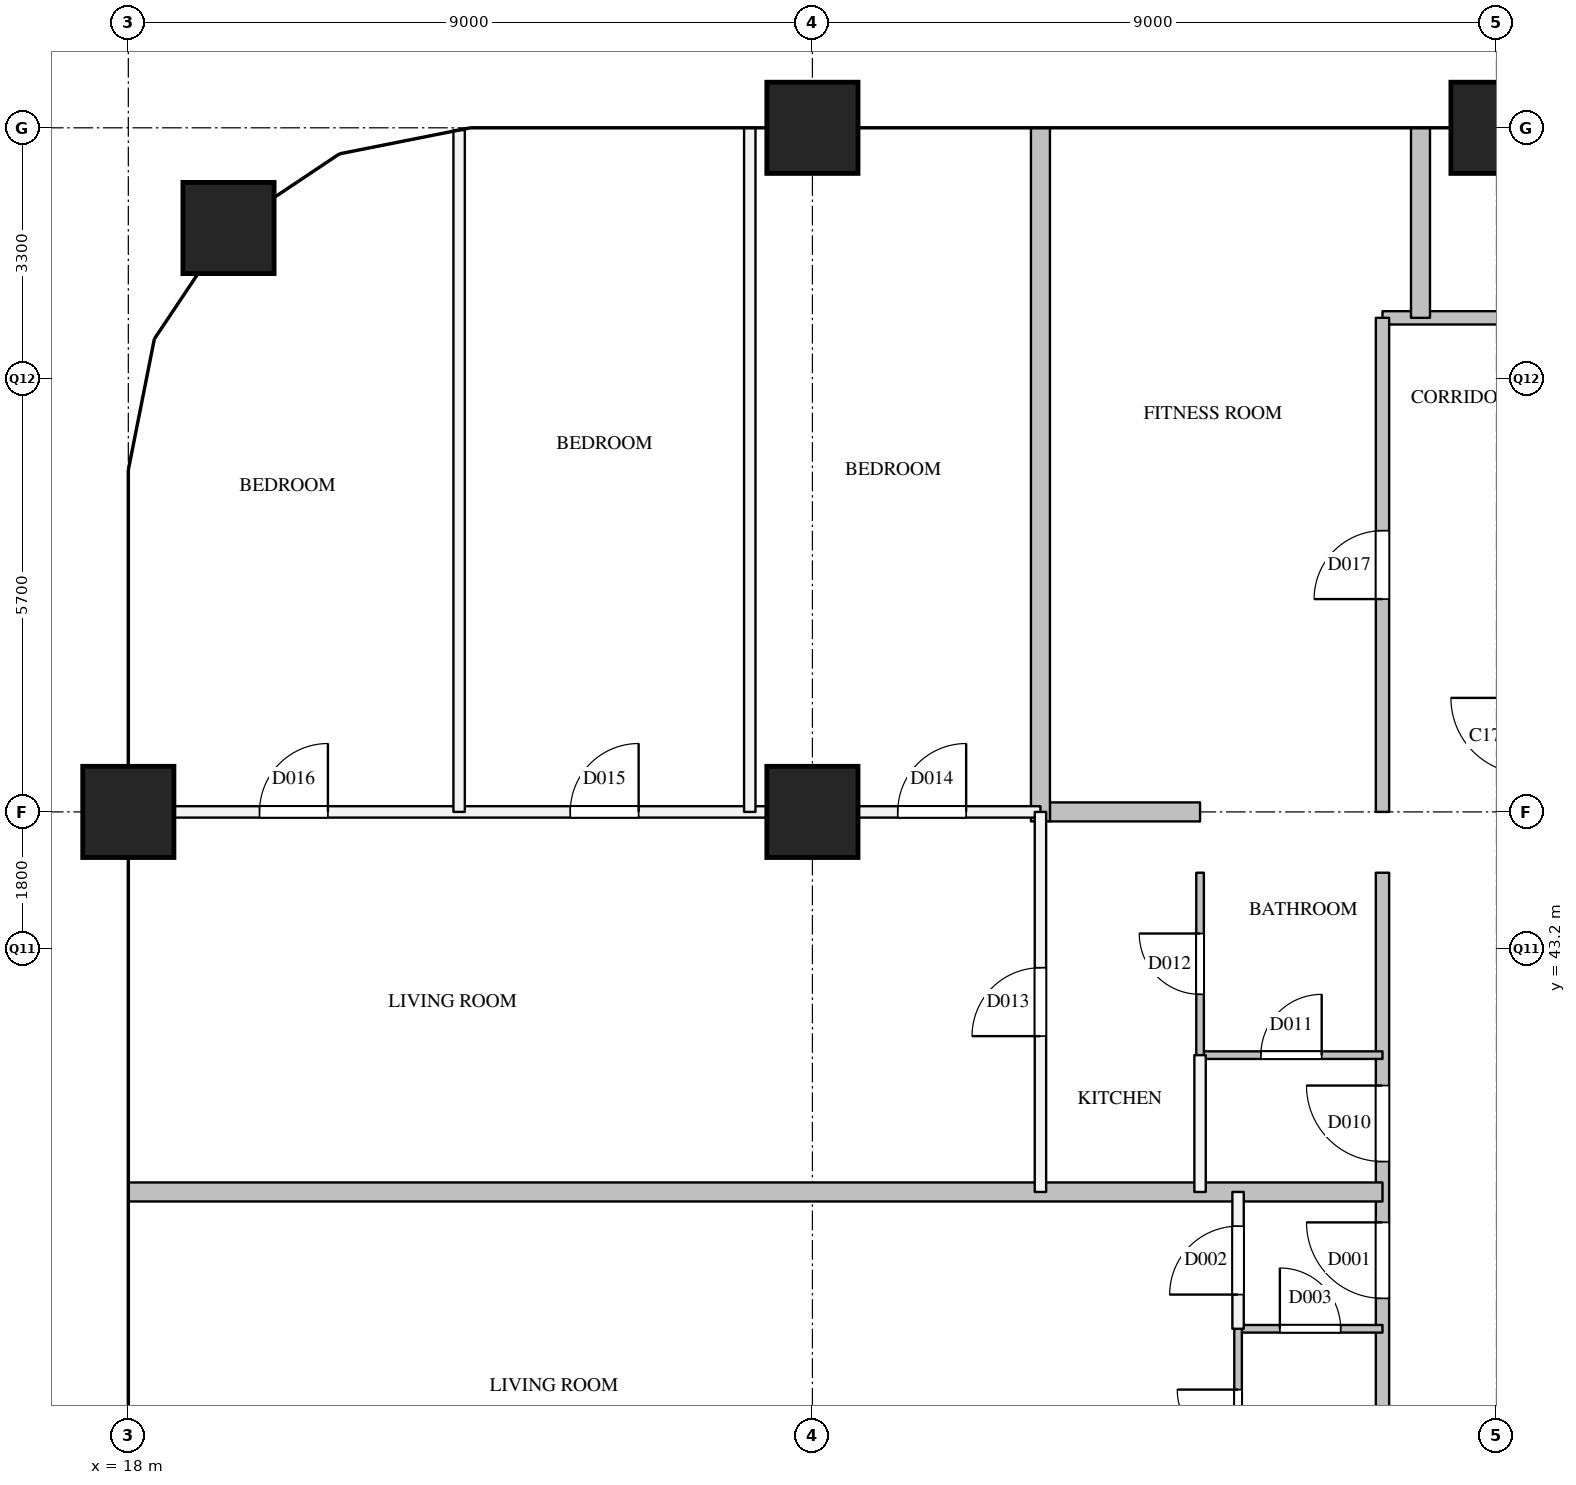
"""IFC4 building model, lengths in metres.
Left out: names, types, materials, properties, quantities, classifications, styles, units other than length and angle.
Written with IfcOpenShell. Run it as: python <this file> out.ifc"""

import sys

from ifc_helpers import new_model, si_unit, direction, frame, frame_2d, origin, origin_2d, place, context, subcontext, project, spatial, rectangle, extrude, element, fill, save


model = new_model("IFC4")
c1 = context("Model", 3, precision=1e-05, world=origin(), true_north=direction((0.0, 1.0)))
c2 = subcontext(c1, "Body", "Model", "MODEL_VIEW")
j1 = project(units=[si_unit("LENGTHUNIT", "METRE"), si_unit("PLANEANGLEUNIT", "RADIAN")], contexts=[c1])
p1 = place(None, origin())
s1 = spatial("IfcSite", under=j1, at=p1, CompositionType="ELEMENT")
p2 = place(p1, origin())
s2 = spatial("IfcBuilding", under=s1, at=p2, CompositionType="ELEMENT")
p3 = place(p2, frame((0.0, 0.0, 254.0)))
s3 = spatial("IfcBuildingStorey", under=s2, at=p3, CompositionType="ELEMENT", Elevation=254.0)
for number, where, z_axis, x_axis in (
    (1, (18.0, 45.0, 0.0), (0.0, 0.0, 1.0), (1.0, 0.0, 0.0)),
    (2, (19.318, 52.682, 0.0), (0.0, 0.0, 1.0), (1.0, 0.0, 0.0)),
    (3, (27.0, 45.0, 0.0), (0.0, 0.0, 1.0), (1.0, 0.0, 0.0)),
    (4, (27.0, 54.0, 0.0), (0.0, 0.0, 1.0), (1.0, 0.0, 0.0)),
    (5, (36.0, 54.0, 0.0), (0.0, 0.0, 1.0), (1.0, 0.0, 0.0)),
):
    element("IfcColumn", number, at=place(p3, frame(where, z_axis=z_axis, x_axis=x_axis)), inside=s3, PredefinedType="COLUMN", context=c2, shape_type="SweptSolid", body=[
        extrude(rectangle(XDim=1.2, YDim=1.2, at=origin_2d()), origin(), (0.0, 0.0, 1.0), 3.9),
    ])
p4 = place(p3, frame((34.5, 51.5, 0.0), z_axis=(0.0, 0.0, 1.0), x_axis=(1.0, 0.0, 0.0)))
e6 = element("IfcWall", 6, at=p4, inside=s3, PredefinedType="PARTITIONING", context=c2, shape_type="SweptSolid", body=[
    extrude(rectangle(XDim=15.4, YDim=0.175, at=frame_2d((7.7, 0.0))), origin(), (0.0, 0.0, 1.0), 3.6),
])
p5 = place(p4, frame((5.892, 0.0, 0.0)))
e7 = element("IfcOpeningElement", 7, at=p5, cuts=e6, PredefinedType="OPENING", context=c2, shape_type="SweptSolid", body=[
    extrude(rectangle(XDim=1.0, YDim=2.1, at=frame_2d((0.5, 1.05))), frame((0.0, 0.097, 0.0), z_axis=(0.0, -1.0, 0.0), x_axis=(1.0, 0.0, 0.0)), (0.0, 0.0, 1.0), 0.195),
])
p6 = place(p3, frame((34.5, 28.5, 0.0), z_axis=(0.0, 0.0, 1.0), x_axis=(0.0, 1.0, 0.0)))
e8 = element("IfcWall", 8, at=p6, inside=s3, PredefinedType="PARTITIONING", context=c2, shape_type="SweptSolid", body=[
    extrude(rectangle(XDim=15.7, YDim=0.175, at=frame_2d((7.85, 0.0))), origin(), (0.0, 0.0, 1.0), 3.6),
])
p7 = place(p6, frame((10.1, 0.0, 0.0)))
e9 = element("IfcOpeningElement", 9, at=p7, cuts=e8, PredefinedType="OPENING", context=c2, shape_type="SweptSolid", body=[
    extrude(rectangle(XDim=1.0, YDim=2.1, at=frame_2d((0.5, 1.05))), frame((0.0, 0.097, 0.0), z_axis=(0.0, -1.0, 0.0), x_axis=(1.0, 0.0, 0.0)), (0.0, 0.0, 1.0), 0.195),
])
p8 = place(p6, frame((11.9, 0.0, 0.0)))
e10 = element("IfcOpeningElement", 10, at=p8, cuts=e8, PredefinedType="OPENING", context=c2, shape_type="SweptSolid", body=[
    extrude(rectangle(XDim=1.0, YDim=2.1, at=frame_2d((0.5, 1.05))), frame((0.0, 0.097, 0.0), z_axis=(0.0, -1.0, 0.0), x_axis=(1.0, 0.0, 0.0)), (0.0, 0.0, 1.0), 0.195),
])
p9 = place(p3, frame((34.5, 45.0, 0.0), z_axis=(0.0, 0.0, 1.0), x_axis=(0.0, 1.0, 0.0)))
e11 = element("IfcWall", 11, at=p9, inside=s3, PredefinedType="PARTITIONING", context=c2, shape_type="SweptSolid", body=[
    extrude(rectangle(XDim=6.5, YDim=0.175, at=frame_2d((3.25, 0.0))), origin(), (0.0, 0.0, 1.0), 3.6),
])
p10 = place(p9, frame((2.8, 0.0, 0.0)))
e12 = element("IfcOpeningElement", 12, at=p10, cuts=e11, PredefinedType="OPENING", context=c2, shape_type="SweptSolid", body=[
    extrude(rectangle(XDim=0.9, YDim=2.1, at=frame_2d((0.45, 1.05))), frame((0.0, 0.097, 0.0), z_axis=(0.0, -1.0, 0.0), x_axis=(1.0, 0.0, 0.0)), (0.0, 0.0, 1.0), 0.195),
])
p11 = place(p3, frame((18.0, 45.0, 0.0), z_axis=(0.0, 0.0, 1.0), x_axis=(1.0, 0.0, 0.0)))
e13 = element("IfcWall", 13, at=p11, inside=s3, PredefinedType="PARTITIONING", context=c2, shape_type="SweptSolid", body=[
    extrude(rectangle(XDim=12.0, YDim=0.15, at=frame_2d((6.0, 0.0))), origin(), (0.0, 0.0, 1.0), 3.6),
])
p12 = place(p11, frame((10.123, 0.0, 0.0)))
e14 = element("IfcOpeningElement", 14, at=p12, cuts=e13, PredefinedType="OPENING", context=c2, shape_type="SweptSolid", body=[
    extrude(rectangle(XDim=0.9, YDim=2.1, at=frame_2d((0.45, 1.05))), frame((0.0, 0.085, 0.0), z_axis=(0.0, -1.0, 0.0), x_axis=(1.0, 0.0, 0.0)), (0.0, 0.0, 1.0), 0.17),
])
p13 = place(p11, frame((5.814, 0.0, 0.0)))
e15 = element("IfcOpeningElement", 15, at=p13, cuts=e13, PredefinedType="OPENING", context=c2, shape_type="SweptSolid", body=[
    extrude(rectangle(XDim=0.9, YDim=2.1, at=frame_2d((0.45, 1.05))), frame((0.0, 0.085, 0.0), z_axis=(0.0, -1.0, 0.0), x_axis=(1.0, 0.0, 0.0)), (0.0, 0.0, 1.0), 0.17),
])
p14 = place(p11, frame((1.726, 0.0, 0.0)))
e16 = element("IfcOpeningElement", 16, at=p14, cuts=e13, PredefinedType="OPENING", context=c2, shape_type="SweptSolid", body=[
    extrude(rectangle(XDim=0.9, YDim=2.1, at=frame_2d((0.45, 1.05))), frame((0.0, 0.085, 0.0), z_axis=(0.0, -1.0, 0.0), x_axis=(1.0, 0.0, 0.0)), (0.0, 0.0, 1.0), 0.17),
])
p15 = place(p3, frame((22.352, 45.0, 0.0), z_axis=(0.0, 0.0, 1.0), x_axis=(0.0, 1.0, 0.0)))
e17 = element("IfcWall", 17, at=p15, inside=s3, PredefinedType="PARTITIONING", context=c2, shape_type="SweptSolid", body=[
    extrude(rectangle(XDim=8.97, YDim=0.15, at=frame_2d((4.485, 0.0))), origin(), (0.0, 0.0, 1.0), 2.6),
])
p16 = place(p3, frame((26.176, 45.0, 0.0), z_axis=(0.0, 0.0, 1.0), x_axis=(0.0, 1.0, 0.0)))
e18 = element("IfcWall", 18, at=p16, inside=s3, PredefinedType="PARTITIONING", context=c2, shape_type="SweptSolid", body=[
    extrude(rectangle(XDim=9.0, YDim=0.15, at=frame_2d((4.5, 0.0))), origin(), (0.0, 0.0, 1.0), 2.6),
])
p17 = place(p3, frame((30.0, 40.0, 0.0), z_axis=(0.0, 0.0, 1.0), x_axis=(0.0, 1.0, 0.0)))
e19 = element("IfcWall", 19, at=p17, inside=s3, PredefinedType="PARTITIONING", context=c2, shape_type="SweptSolid", body=[
    extrude(rectangle(XDim=5.0, YDim=0.15, at=frame_2d((2.5, 0.0))), origin(), (0.0, 0.0, 1.0), 3.6),
])
p18 = place(p17, frame((2.05, 0.0, 0.0)))
e20 = element("IfcOpeningElement", 20, at=p18, cuts=e19, PredefinedType="OPENING", context=c2, shape_type="SweptSolid", body=[
    extrude(rectangle(XDim=0.9, YDim=2.1, at=frame_2d((0.45, 1.05))), frame((0.0, 0.085, 0.0), z_axis=(0.0, -1.0, 0.0), x_axis=(1.0, 0.0, 0.0)), (0.0, 0.0, 1.0), 0.17),
])
p19 = place(p3, frame((32.1, 40.0, 0.0), z_axis=(0.0, 0.0, 1.0), x_axis=(0.0, 1.0, 0.0)))
e21 = element("IfcWall", 21, at=p19, inside=s3, PredefinedType="PARTITIONING", context=c2, shape_type="SweptSolid", body=[
    extrude(rectangle(XDim=1.8, YDim=0.15, at=frame_2d((0.9, 0.0))), origin(), (0.0, 0.0, 1.0), 3.6),
])
p20 = place(p3, frame((32.6, 38.2, 0.0), z_axis=(0.0, 0.0, 1.0), x_axis=(0.0, 1.0, 0.0)))
e22 = element("IfcWall", 22, at=p20, inside=s3, PredefinedType="PARTITIONING", context=c2, shape_type="SweptSolid", body=[
    extrude(rectangle(XDim=1.8, YDim=0.15, at=frame_2d((0.9, 0.0))), origin(), (0.0, 0.0, 1.0), 3.6),
])
p21 = place(p20, frame((0.45, 0.0, 0.0)))
e23 = element("IfcOpeningElement", 23, at=p21, cuts=e22, PredefinedType="OPENING", context=c2, shape_type="SweptSolid", body=[
    extrude(rectangle(XDim=0.9, YDim=2.1, at=frame_2d((0.45, 1.05))), frame((0.0, 0.085, 0.0), z_axis=(0.0, -1.0, 0.0), x_axis=(1.0, 0.0, 0.0)), (0.0, 0.0, 1.0), 0.17),
])
p22 = place(p3, frame((18.0, 40.0, 0.0), z_axis=(0.0, 0.0, 1.0), x_axis=(1.0, 0.0, 0.0)))
e24 = element("IfcWall", 24, at=p22, inside=s3, PredefinedType="PARTITIONING", context=c2, shape_type="SweptSolid", body=[
    extrude(rectangle(XDim=16.5, YDim=0.25, at=frame_2d((8.25, 0.0))), origin(), (0.0, 0.0, 1.0), 2.6),
])
p23 = place(p3, frame((30.125, 45.0, 0.0), z_axis=(0.0, 0.0, 1.0), x_axis=(1.0, 0.0, 0.0)))
e25 = element("IfcWall", 25, at=p23, inside=s3, PredefinedType="PARTITIONING", context=c2, shape_type="SweptSolid", body=[
    extrude(rectangle(XDim=1.975, YDim=0.25, at=frame_2d((0.988, 0.0))), origin(), (0.0, 0.0, 1.0), 3.6),
])
p24 = place(p3, frame((30.0, 44.875, 0.0), z_axis=(0.0, 0.0, 1.0), x_axis=(0.0, 1.0, 0.0)))
e26 = element("IfcWall", 26, at=p24, inside=s3, PredefinedType="PARTITIONING", context=c2, shape_type="SweptSolid", body=[
    extrude(rectangle(XDim=9.125, YDim=0.25, at=frame_2d((4.562, 0.0))), origin(), (0.0, 0.0, 1.0), 2.6),
])
p25 = place(p3, frame((35.0, 51.5, 0.0), z_axis=(0.0, 0.0, 1.0), x_axis=(0.0, 1.0, 0.0)))
e27 = element("IfcWall", 27, at=p25, inside=s3, PredefinedType="PARTITIONING", context=c2, shape_type="SweptSolid", body=[
    extrude(rectangle(XDim=2.5, YDim=0.25, at=frame_2d((1.25, 0.0))), origin(), (0.0, 0.0, 1.0), 2.6),
])
p26 = place(p3, frame((32.6, 38.2, 0.0), z_axis=(0.0, 0.0, 1.0), x_axis=(1.0, 0.0, 0.0)))
e28 = element("IfcWall", 28, at=p26, inside=s3, PredefinedType="PARTITIONING", context=c2, shape_type="SweptSolid", body=[
    extrude(rectangle(XDim=1.9, YDim=0.1, at=frame_2d((0.95, 0.0))), origin(), (0.0, 0.0, 1.0), 3.6),
])
p27 = place(p26, frame((0.55, 0.0, 0.0)))
e29 = element("IfcOpeningElement", 29, at=p27, cuts=e28, PredefinedType="OPENING", context=c2, shape_type="SweptSolid", body=[
    extrude(rectangle(XDim=0.8, YDim=2.1, at=frame_2d((0.4, 1.05))), frame((0.0, 0.06, 0.0), z_axis=(0.0, -1.0, 0.0), x_axis=(1.0, 0.0, 0.0)), (0.0, 0.0, 1.0), 0.12),
])
p28 = place(p3, frame((32.1, 41.8, 0.0), z_axis=(0.0, 0.0, 1.0), x_axis=(1.0, 0.0, 0.0)))
e30 = element("IfcWall", 30, at=p28, inside=s3, PredefinedType="PARTITIONING", context=c2, shape_type="SweptSolid", body=[
    extrude(rectangle(XDim=2.4, YDim=0.1, at=frame_2d((1.2, 0.0))), origin(), (0.0, 0.0, 1.0), 3.6),
])
p29 = place(p28, frame((0.8, 0.0, 0.0)))
e31 = element("IfcOpeningElement", 31, at=p29, cuts=e30, PredefinedType="OPENING", context=c2, shape_type="SweptSolid", body=[
    extrude(rectangle(XDim=0.8, YDim=2.1, at=frame_2d((0.4, 1.05))), frame((0.0, 0.06, 0.0), z_axis=(0.0, -1.0, 0.0), x_axis=(1.0, 0.0, 0.0)), (0.0, 0.0, 1.0), 0.12),
])
p30 = place(p3, frame((32.1, 41.8, 0.0), z_axis=(0.0, 0.0, 1.0), x_axis=(0.0, 1.0, 0.0)))
e32 = element("IfcWall", 32, at=p30, inside=s3, PredefinedType="PARTITIONING", context=c2, shape_type="SweptSolid", body=[
    extrude(rectangle(XDim=2.4, YDim=0.1, at=frame_2d((1.2, 0.0))), origin(), (0.0, 0.0, 1.0), 3.6),
])
p31 = place(p30, frame((0.8, 0.0, 0.0)))
e33 = element("IfcOpeningElement", 33, at=p31, cuts=e32, PredefinedType="OPENING", context=c2, shape_type="SweptSolid", body=[
    extrude(rectangle(XDim=0.8, YDim=2.1, at=frame_2d((0.4, 1.05))), frame((0.0, 0.06, 0.0), z_axis=(0.0, -1.0, 0.0), x_axis=(1.0, 0.0, 0.0)), (0.0, 0.0, 1.0), 0.12),
])
p32 = place(p3, frame((32.6, 35.8, 0.0), z_axis=(0.0, 0.0, 1.0), x_axis=(0.0, 1.0, 0.0)))
e34 = element("IfcWall", 34, at=p32, inside=s3, PredefinedType="PARTITIONING", context=c2, shape_type="SweptSolid", body=[
    extrude(rectangle(XDim=2.4, YDim=0.1, at=frame_2d((1.2, 0.0))), origin(), (0.0, 0.0, 1.0), 3.6),
])
p33 = place(p32, frame((0.8, 0.0, 0.0)))
e35 = element("IfcOpeningElement", 35, at=p33, cuts=e34, PredefinedType="OPENING", context=c2, shape_type="SweptSolid", body=[
    extrude(rectangle(XDim=0.8, YDim=2.1, at=frame_2d((0.4, 1.05))), frame((0.0, 0.06, 0.0), z_axis=(0.0, -1.0, 0.0), x_axis=(1.0, 0.0, 0.0)), (0.0, 0.0, 1.0), 0.12),
])
p34 = place(p7, origin())
e36 = element("IfcDoor", 36, at=p34, inside=s3, OperationType="SINGLE_SWING_RIGHT", PredefinedType="DOOR", context=c2, shape_type="SweptSolid", body=[
    extrude(rectangle(XDim=1.0, YDim=2.1, at=frame_2d((0.5, 1.05))), frame((0.0, 0.025, 0.0), z_axis=(0.0, -1.0, 0.0), x_axis=(1.0, 0.0, 0.0)), (0.0, 0.0, 1.0), 0.05),
])
fill(e9, e36)
p35 = place(p21, origin())
e37 = element("IfcDoor", 37, at=p35, inside=s3, OperationType="SINGLE_SWING_LEFT", PredefinedType="DOOR", context=c2, shape_type="SweptSolid", body=[
    extrude(rectangle(XDim=0.9, YDim=2.1, at=frame_2d((0.45, 1.05))), frame((0.0, 0.025, 0.0), z_axis=(0.0, -1.0, 0.0), x_axis=(1.0, 0.0, 0.0)), (0.0, 0.0, 1.0), 0.05),
])
fill(e23, e37)
p36 = place(p27, origin())
e38 = element("IfcDoor", 38, at=p36, inside=s3, OperationType="SINGLE_SWING_LEFT", PredefinedType="DOOR", context=c2, shape_type="SweptSolid", body=[
    extrude(rectangle(XDim=0.8, YDim=2.1, at=frame_2d((0.4, 1.05))), frame((0.0, 0.025, 0.0), z_axis=(0.0, -1.0, 0.0), x_axis=(1.0, 0.0, 0.0)), (0.0, 0.0, 1.0), 0.05),
])
fill(e29, e38)
p37 = place(p33, origin())
e39 = element("IfcDoor", 39, at=p37, inside=s3, OperationType="SINGLE_SWING_RIGHT", PredefinedType="DOOR", context=c2, shape_type="SweptSolid", body=[
    extrude(rectangle(XDim=0.8, YDim=2.1, at=frame_2d((0.4, 1.05))), frame((0.0, 0.025, 0.0), z_axis=(0.0, -1.0, 0.0), x_axis=(1.0, 0.0, 0.0)), (0.0, 0.0, 1.0), 0.05),
])
fill(e35, e39)
p38 = place(p8, origin())
e40 = element("IfcDoor", 40, at=p38, inside=s3, OperationType="SINGLE_SWING_RIGHT", PredefinedType="DOOR", context=c2, shape_type="SweptSolid", body=[
    extrude(rectangle(XDim=1.0, YDim=2.1, at=frame_2d((0.5, 1.05))), frame((0.0, 0.025, 0.0), z_axis=(0.0, -1.0, 0.0), x_axis=(1.0, 0.0, 0.0)), (0.0, 0.0, 1.0), 0.05),
])
fill(e10, e40)
p39 = place(p29, origin())
e41 = element("IfcDoor", 41, at=p39, inside=s3, OperationType="SINGLE_SWING_RIGHT", PredefinedType="DOOR", context=c2, shape_type="SweptSolid", body=[
    extrude(rectangle(XDim=0.8, YDim=2.1, at=frame_2d((0.4, 1.05))), frame((0.0, 0.025, 0.0), z_axis=(0.0, -1.0, 0.0), x_axis=(1.0, 0.0, 0.0)), (0.0, 0.0, 1.0), 0.05),
])
fill(e31, e41)
p40 = place(p31, origin())
e42 = element("IfcDoor", 42, at=p40, inside=s3, OperationType="SINGLE_SWING_RIGHT", PredefinedType="DOOR", context=c2, shape_type="SweptSolid", body=[
    extrude(rectangle(XDim=0.8, YDim=2.1, at=frame_2d((0.4, 1.05))), frame((0.0, 0.025, 0.0), z_axis=(0.0, -1.0, 0.0), x_axis=(1.0, 0.0, 0.0)), (0.0, 0.0, 1.0), 0.05),
])
fill(e33, e42)
p41 = place(p18, origin())
e43 = element("IfcDoor", 43, at=p41, inside=s3, OperationType="SINGLE_SWING_LEFT", PredefinedType="DOOR", context=c2, shape_type="SweptSolid", body=[
    extrude(rectangle(XDim=0.9, YDim=2.1, at=frame_2d((0.45, 1.05))), frame((0.0, 0.025, 0.0), z_axis=(0.0, -1.0, 0.0), x_axis=(1.0, 0.0, 0.0)), (0.0, 0.0, 1.0), 0.05),
])
fill(e20, e43)
p42 = place(p12, origin())
e44 = element("IfcDoor", 44, at=p42, inside=s3, OperationType="SINGLE_SWING_RIGHT", PredefinedType="DOOR", context=c2, shape_type="SweptSolid", body=[
    extrude(rectangle(XDim=0.9, YDim=2.1, at=frame_2d((0.45, 1.05))), frame((0.0, 0.025, 0.0), z_axis=(0.0, -1.0, 0.0), x_axis=(1.0, 0.0, 0.0)), (0.0, 0.0, 1.0), 0.05),
])
fill(e14, e44)
p43 = place(p13, origin())
e45 = element("IfcDoor", 45, at=p43, inside=s3, OperationType="SINGLE_SWING_RIGHT", PredefinedType="DOOR", context=c2, shape_type="SweptSolid", body=[
    extrude(rectangle(XDim=0.9, YDim=2.1, at=frame_2d((0.45, 1.05))), frame((0.0, 0.025, 0.0), z_axis=(0.0, -1.0, 0.0), x_axis=(1.0, 0.0, 0.0)), (0.0, 0.0, 1.0), 0.05),
])
fill(e15, e45)
p44 = place(p14, origin())
e46 = element("IfcDoor", 46, at=p44, inside=s3, OperationType="SINGLE_SWING_RIGHT", PredefinedType="DOOR", context=c2, shape_type="SweptSolid", body=[
    extrude(rectangle(XDim=0.9, YDim=2.1, at=frame_2d((0.45, 1.05))), frame((0.0, 0.025, 0.0), z_axis=(0.0, -1.0, 0.0), x_axis=(1.0, 0.0, 0.0)), (0.0, 0.0, 1.0), 0.05),
])
fill(e16, e46)
p45 = place(p10, origin())
e47 = element("IfcDoor", 47, at=p45, inside=s3, OperationType="SINGLE_SWING_LEFT", PredefinedType="DOOR", context=c2, shape_type="SweptSolid", body=[
    extrude(rectangle(XDim=0.9, YDim=2.1, at=frame_2d((0.45, 1.05))), frame((0.0, 0.025, 0.0), z_axis=(0.0, -1.0, 0.0), x_axis=(1.0, 0.0, 0.0)), (0.0, 0.0, 1.0), 0.05),
])
fill(e12, e47)
save(model, sys.argv[1])
